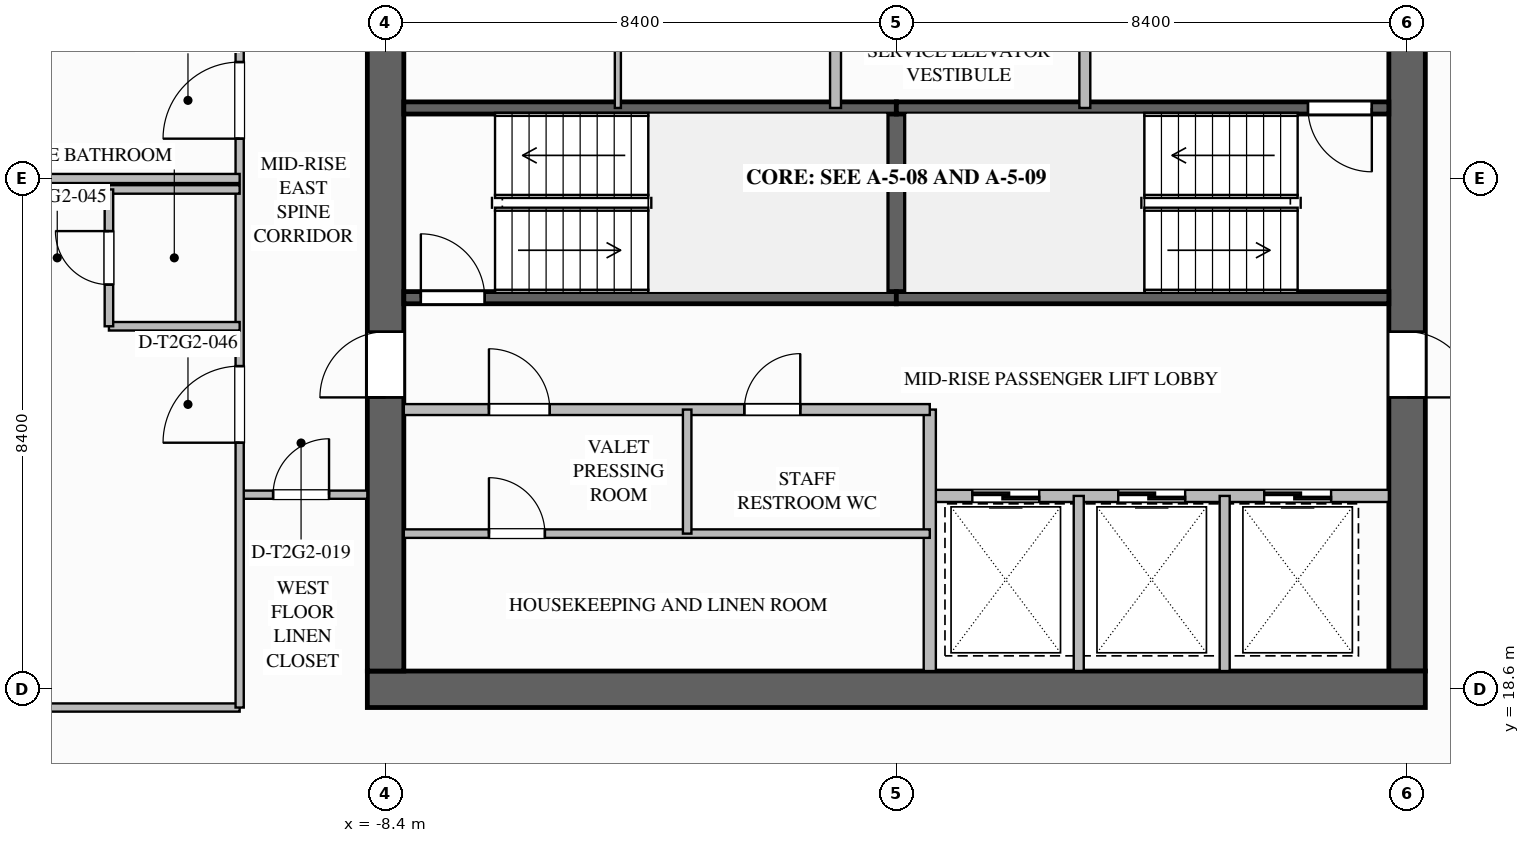
"""IFC4 building model, lengths in metres.
Left out: names, types, materials, properties, quantities, classifications, styles, units other than length and angle.
Written with IfcOpenShell. Run it as: python <this file> out.ifc"""

import sys

from ifc_helpers import new_model, si_unit, direction, frame, frame_2d, origin, place, context, subcontext, project, spatial, rectangle, extrude, element, fill, save


model = new_model("IFC4")
c1 = context("Model", 3, precision=1e-05, world=origin(), true_north=direction((0.0, 1.0)))
c2 = subcontext(c1, "Body", "Model", "MODEL_VIEW")
j1 = project(units=[si_unit("LENGTHUNIT", "METRE"), si_unit("PLANEANGLEUNIT", "RADIAN")], contexts=[c1])
p1 = place(None, origin())
s1 = spatial("IfcSite", under=j1, at=p1, CompositionType="ELEMENT")
p2 = place(p1, origin())
s2 = spatial("IfcBuilding", under=s1, at=p2, CompositionType="ELEMENT")
p3 = place(p2, frame((0.0, 0.0, 102.3)))
s3 = spatial("IfcBuildingStorey", under=s2, at=p3, CompositionType="ELEMENT", Elevation=102.3)
p4 = place(p3, frame((8.4, 35.1, 0.0), z_axis=(0.0, 0.0, 1.0), x_axis=(0.0, -1.0, 0.0)))
e1 = element("IfcWall", 1, at=p4, inside=s3, PredefinedType="SHEAR", context=c2, shape_type="SweptSolid", body=[
    extrude(rectangle(XDim=16.2, YDim=0.6, at=frame_2d((8.1, 0.0))), origin(), (0.0, 0.0, 1.0), 3.5),
])
p5 = place(p4, frame((3.08, 0.0, 0.0)))
e2 = element("IfcOpeningElement", 2, at=p5, cuts=e1, PredefinedType="OPENING", context=c2, shape_type="SweptSolid", body=[
    extrude(rectangle(XDim=1.12, YDim=2.1, at=frame_2d((0.56, 1.05))), frame((0.0, 0.31, 0.0), z_axis=(0.0, -1.0, 0.0), x_axis=(1.0, 0.0, 0.0)), (0.0, 0.0, 1.0), 0.62),
])
p6 = place(p4, frame((10.62, 0.0, 0.0)))
e3 = element("IfcOpeningElement", 3, at=p6, cuts=e1, PredefinedType="OPENING", context=c2, shape_type="SweptSolid", body=[
    extrude(rectangle(XDim=1.08, YDim=2.04, at=frame_2d((0.54, 1.02))), frame((0.0, 0.31, 0.0), z_axis=(0.0, -1.0, 0.0), x_axis=(1.0, 0.0, 0.0)), (0.0, 0.0, 1.0), 0.62),
])
p7 = place(p3, frame((8.7, 18.6, 0.0), z_axis=(0.0, 0.0, 1.0), x_axis=(-1.0, 0.0, 0.0)))
e4 = element("IfcWall", 4, at=p7, inside=s3, PredefinedType="SHEAR", context=c2, shape_type="SweptSolid", body=[
    extrude(rectangle(XDim=17.4, YDim=0.6, at=frame_2d((8.7, 0.0))), origin(), (0.0, 0.0, 1.0), 3.5),
])
p8 = place(p3, frame((-8.4, 18.9, 0.0), z_axis=(0.0, 0.0, 1.0), x_axis=(0.0, 1.0, 0.0)))
e5 = element("IfcWall", 5, at=p8, inside=s3, PredefinedType="SHEAR", context=c2, shape_type="SweptSolid", body=[
    extrude(rectangle(XDim=16.2, YDim=0.6, at=frame_2d((8.1, 0.0))), origin(), (0.0, 0.0, 1.0), 3.5),
])
p9 = place(p8, frame((4.5, 0.0, 0.0)))
e6 = element("IfcOpeningElement", 6, at=p9, cuts=e5, PredefinedType="OPENING", context=c2, shape_type="SweptSolid", body=[
    extrude(rectangle(XDim=1.08, YDim=2.04, at=frame_2d((0.54, 1.02))), frame((0.0, 0.31, 0.0), z_axis=(0.0, -1.0, 0.0), x_axis=(1.0, 0.0, 0.0)), (0.0, 0.0, 1.0), 0.62),
])
p10 = place(p3, frame((0.0, 25.04, 0.0), z_axis=(0.0, 0.0, 1.0), x_axis=(0.0, 1.0, 0.0)))
e7 = element("IfcWall", 7, at=p10, inside=s3, PredefinedType="SOLIDWALL", context=c2, shape_type="SweptSolid", body=[
    extrude(rectangle(XDim=3.12, YDim=0.3, at=frame_2d((1.56, 0.0))), origin(), (0.0, 0.0, 1.0), 3.24),
])
p11 = place(p3, frame((-8.1, 25.04, 0.0), z_axis=(0.0, 0.0, 1.0), x_axis=(1.0, 0.0, 0.0)))
e8 = element("IfcWall", 8, at=p11, inside=s3, PredefinedType="SOLIDWALL", context=c2, shape_type="SweptSolid", body=[
    extrude(rectangle(XDim=8.1, YDim=0.2, at=frame_2d((4.05, 0.0))), origin(), (0.0, 0.0, 1.0), 3.24),
])
p12 = place(p11, frame((0.28, 0.0, 0.0)))
e9 = element("IfcOpeningElement", 9, at=p12, cuts=e8, PredefinedType="OPENING", context=c2, shape_type="SweptSolid", body=[
    extrude(rectangle(XDim=1.05, YDim=2.1, at=frame_2d((0.525, 1.05))), frame((0.0, 0.11, 0.0), z_axis=(0.0, -1.0, 0.0), x_axis=(1.0, 0.0, 0.0)), (0.0, 0.0, 1.0), 0.22),
])
for number, where, z_axis, x_axis in (
    (10, (-8.1, 28.16, 0.0), (0.0, 0.0, 1.0), (1.0, 0.0, 0.0)),
    (11, (0.0, 25.04, 0.0), (0.0, 0.0, 1.0), (1.0, 0.0, 0.0)),
):
    element("IfcWall", number, at=place(p3, frame(where, z_axis=z_axis, x_axis=x_axis)), inside=s3, PredefinedType="SOLIDWALL", context=c2, shape_type="SweptSolid", body=[
        extrude(rectangle(XDim=8.1, YDim=0.2, at=frame_2d((4.05, 0.0))), origin(), (0.0, 0.0, 1.0), 3.24),
    ])
p13 = place(p3, frame((8.1, 28.16, 0.0), z_axis=(0.0, 0.0, 1.0), x_axis=(-1.0, 0.0, 0.0)))
e12 = element("IfcWall", 12, at=p13, inside=s3, PredefinedType="SOLIDWALL", context=c2, shape_type="SweptSolid", body=[
    extrude(rectangle(XDim=8.1, YDim=0.2, at=frame_2d((4.05, 0.0))), origin(), (0.0, 0.0, 1.0), 3.24),
])
p14 = place(p13, frame((0.28, 0.0, 0.0)))
e13 = element("IfcOpeningElement", 13, at=p14, cuts=e12, PredefinedType="OPENING", context=c2, shape_type="SweptSolid", body=[
    extrude(rectangle(XDim=1.05, YDim=2.1, at=frame_2d((0.525, 1.05))), frame((0.0, 0.11, 0.0), z_axis=(0.0, -1.0, 0.0), x_axis=(1.0, 0.0, 0.0)), (0.0, 0.0, 1.0), 0.22),
])
p15 = place(p3, frame((3.1, 28.16, 0.0), z_axis=(0.0, 0.0, 1.0), x_axis=(0.0, 1.0, 0.0)))
e14 = element("IfcWall", 14, at=p15, inside=s3, PredefinedType="SOLIDWALL", context=c2, shape_type="SweptSolid", body=[
    extrude(rectangle(XDim=4.06, YDim=0.18, at=frame_2d((2.03, 0.0))), origin(), (0.0, 0.0, 1.0), 3.24),
])
p16 = place(p15, frame((1.4, 0.0, 0.0)))
e15 = element("IfcOpeningElement", 15, at=p16, cuts=e14, PredefinedType="OPENING", context=c2, shape_type="SweptSolid", body=[
    extrude(rectangle(XDim=1.12, YDim=2.1, at=frame_2d((0.56, 1.05))), frame((0.0, 0.1, 0.0), z_axis=(0.0, -1.0, 0.0), x_axis=(1.0, 0.0, 0.0)), (0.0, 0.0, 1.0), 0.2),
])
p17 = place(p3, frame((-1.0, 28.16, 0.0), z_axis=(0.0, 0.0, 1.0), x_axis=(0.0, 1.0, 0.0)))
e16 = element("IfcWall", 16, at=p17, inside=s3, PredefinedType="SOLIDWALL", context=c2, shape_type="SweptSolid", body=[
    extrude(rectangle(XDim=4.02, YDim=0.18, at=frame_2d((2.01, 0.0))), origin(), (0.0, 0.0, 1.0), 3.24),
])
p18 = place(p17, frame((1.4, 0.0, 0.0)))
e17 = element("IfcOpeningElement", 17, at=p18, cuts=e16, PredefinedType="OPENING", context=c2, shape_type="SweptSolid", body=[
    extrude(rectangle(XDim=1.0, YDim=2.1, at=frame_2d((0.5, 1.05))), frame((0.0, 0.1, 0.0), z_axis=(0.0, -1.0, 0.0), x_axis=(1.0, 0.0, 0.0)), (0.0, 0.0, 1.0), 0.2),
])
p19 = place(p3, frame((-4.58, 28.16, 0.0), z_axis=(0.0, 0.0, 1.0), x_axis=(0.0, 1.0, 0.0)))
e18 = element("IfcWall", 18, at=p19, inside=s3, PredefinedType="PARTITIONING", context=c2, shape_type="SweptSolid", body=[
    extrude(rectangle(XDim=4.06, YDim=0.1, at=frame_2d((2.03, 0.0))), origin(), (0.0, 0.0, 1.0), 3.24),
])
p20 = place(p19, frame((1.2, 0.0, 0.0)))
e19 = element("IfcOpeningElement", 19, at=p20, cuts=e18, PredefinedType="OPENING", context=c2, shape_type="SweptSolid", body=[
    extrude(rectangle(XDim=0.92, YDim=2.1, at=frame_2d((0.46, 1.05))), frame((0.0, 0.06, 0.0), z_axis=(0.0, -1.0, 0.0), x_axis=(1.0, 0.0, 0.0)), (0.0, 0.0, 1.0), 0.12),
])
p21 = place(p3, frame((8.1, 21.78, 0.0), z_axis=(0.0, 0.0, 1.0), x_axis=(-1.0, 0.0, 0.0)))
e20 = element("IfcWall", 20, at=p21, inside=s3, PredefinedType="SOLIDWALL", context=c2, shape_type="SweptSolid", body=[
    extrude(rectangle(XDim=7.55, YDim=0.2, at=frame_2d((3.775, 0.0))), origin(), (0.0, 0.0, 1.0), 3.24),
])
p22 = place(p21, frame((5.75, 0.0, 0.0)))
e21 = element("IfcOpeningElement", 21, at=p22, cuts=e20, PredefinedType="OPENING", context=c2, shape_type="SweptSolid", body=[
    extrude(rectangle(XDim=1.1, YDim=2.2, at=frame_2d((0.55, 1.1))), frame((0.0, 0.11, 0.0), z_axis=(0.0, -1.0, 0.0), x_axis=(1.0, 0.0, 0.0)), (0.0, 0.0, 1.0), 0.22),
])
p23 = place(p21, frame((3.35, 0.0, 0.0)))
e22 = element("IfcOpeningElement", 22, at=p23, cuts=e20, PredefinedType="OPENING", context=c2, shape_type="SweptSolid", body=[
    extrude(rectangle(XDim=1.1, YDim=2.2, at=frame_2d((0.55, 1.1))), frame((0.0, 0.11, 0.0), z_axis=(0.0, -1.0, 0.0), x_axis=(1.0, 0.0, 0.0)), (0.0, 0.0, 1.0), 0.22),
])
p24 = place(p21, frame((0.95, 0.0, 0.0)))
e23 = element("IfcOpeningElement", 23, at=p24, cuts=e20, PredefinedType="OPENING", context=c2, shape_type="SweptSolid", body=[
    extrude(rectangle(XDim=1.1, YDim=2.2, at=frame_2d((0.55, 1.1))), frame((0.0, 0.11, 0.0), z_axis=(0.0, -1.0, 0.0), x_axis=(1.0, 0.0, 0.0)), (0.0, 0.0, 1.0), 0.22),
])
p25 = place(p3, frame((0.55, 18.9, 0.0), z_axis=(0.0, 0.0, 1.0), x_axis=(0.0, 1.0, 0.0)))
e24 = element("IfcWall", 24, at=p25, inside=s3, PredefinedType="SOLIDWALL", context=c2, shape_type="SweptSolid", body=[
    extrude(rectangle(XDim=4.3, YDim=0.2, at=frame_2d((2.15, 0.0))), origin(), (0.0, 0.0, 1.0), 3.24),
])
for number, where, z_axis, x_axis in (
    (25, (3.0, 18.9, 0.0), (0.0, 0.0, 1.0), (0.0, 1.0, 0.0)),
    (26, (5.4, 18.9, 0.0), (0.0, 0.0, 1.0), (0.0, 1.0, 0.0)),
):
    element("IfcWall", number, at=place(p3, frame(where, z_axis=z_axis, x_axis=x_axis)), inside=s3, PredefinedType="PARTITIONING", context=c2, shape_type="SweptSolid", body=[
        extrude(rectangle(XDim=2.88, YDim=0.165, at=frame_2d((1.44, 0.0))), origin(), (0.0, 0.0, 1.0), 3.24),
    ])
p26 = place(p3, frame((-8.1, 23.2, 0.0), z_axis=(0.0, 0.0, 1.0), x_axis=(1.0, 0.0, 0.0)))
e27 = element("IfcWall", 27, at=p26, inside=s3, PredefinedType="SOLIDWALL", context=c2, shape_type="SweptSolid", body=[
    extrude(rectangle(XDim=8.65, YDim=0.18, at=frame_2d((4.325, 0.0))), origin(), (0.0, 0.0, 1.0), 3.24),
])
p27 = place(p26, frame((1.4, 0.0, 0.0)))
e28 = element("IfcOpeningElement", 28, at=p27, cuts=e27, PredefinedType="OPENING", context=c2, shape_type="SweptSolid", body=[
    extrude(rectangle(XDim=1.0, YDim=2.1, at=frame_2d((0.5, 1.05))), frame((0.0, 0.1, 0.0), z_axis=(0.0, -1.0, 0.0), x_axis=(1.0, 0.0, 0.0)), (0.0, 0.0, 1.0), 0.2),
])
p28 = place(p26, frame((5.6, 0.0, 0.0)))
e29 = element("IfcOpeningElement", 29, at=p28, cuts=e27, PredefinedType="OPENING", context=c2, shape_type="SweptSolid", body=[
    extrude(rectangle(XDim=0.92, YDim=2.1, at=frame_2d((0.46, 1.05))), frame((0.0, 0.1, 0.0), z_axis=(0.0, -1.0, 0.0), x_axis=(1.0, 0.0, 0.0)), (0.0, 0.0, 1.0), 0.2),
])
p29 = place(p3, frame((-8.1, 21.16, 0.0), z_axis=(0.0, 0.0, 1.0), x_axis=(1.0, 0.0, 0.0)))
e30 = element("IfcWall", 30, at=p29, inside=s3, PredefinedType="PLUMBINGWALL", context=c2, shape_type="SweptSolid", body=[
    extrude(rectangle(XDim=8.65, YDim=0.14, at=frame_2d((4.325, 0.0))), origin(), (0.0, 0.0, 1.0), 3.24),
])
p30 = place(p29, frame((1.4, 0.0, 0.0)))
e31 = element("IfcOpeningElement", 31, at=p30, cuts=e30, PredefinedType="OPENING", context=c2, shape_type="SweptSolid", body=[
    extrude(rectangle(XDim=0.92, YDim=2.1, at=frame_2d((0.46, 1.05))), frame((0.0, 0.08, 0.0), z_axis=(0.0, -1.0, 0.0), x_axis=(1.0, 0.0, 0.0)), (0.0, 0.0, 1.0), 0.16),
])
p31 = place(p3, frame((-3.44, 21.16, 0.0), z_axis=(0.0, 0.0, 1.0), x_axis=(0.0, 1.0, 0.0)))
e32 = element("IfcWall", 32, at=p31, inside=s3, PredefinedType="PLUMBINGWALL", context=c2, shape_type="SweptSolid", body=[
    extrude(rectangle(XDim=2.04, YDim=0.14, at=frame_2d((1.02, 0.0))), origin(), (0.0, 0.0, 1.0), 3.24),
])
p32 = place(p3, frame((-10.8, 21.8, 0.0), z_axis=(0.0, 0.0, 1.0), x_axis=(1.0, 0.0, 0.0)))
e33 = element("IfcWall", 33, at=p32, inside=s3, PredefinedType="PARTITIONING", context=c2, shape_type="SweptSolid", body=[
    extrude(rectangle(XDim=2.1, YDim=0.135, at=frame_2d((1.05, 0.0))), origin(), (0.0, 0.0, 1.0), 3.24),
])
p33 = place(p32, frame((0.55, 0.0, 0.0)))
e34 = element("IfcOpeningElement", 34, at=p33, cuts=e33, PredefinedType="OPENING", context=c2, shape_type="SweptSolid", body=[
    extrude(rectangle(XDim=0.92, YDim=2.1, at=frame_2d((0.46, 1.05))), frame((0.0, 0.077, 0.0), z_axis=(0.0, -1.0, 0.0), x_axis=(1.0, 0.0, 0.0)), (0.0, 0.0, 1.0), 0.155),
])
p34 = place(p3, frame((-16.2, 18.3, 0.0), z_axis=(0.0, 0.0, 1.0), x_axis=(1.0, 0.0, 0.0)))
e35 = element("IfcWall", 35, at=p34, inside=s3, PredefinedType="PARTITIONING", context=c2, shape_type="SweptSolid", body=[
    extrude(rectangle(XDim=5.4, YDim=0.135, at=frame_2d((2.7, 0.0))), origin(), (0.0, 0.0, 1.0), 3.24),
])
p35 = place(p3, frame((-10.8, 18.3, 0.0), z_axis=(0.0, 0.0, 1.0), x_axis=(0.0, 1.0, 0.0)))
e36 = element("IfcWall", 36, at=p35, inside=s3, PredefinedType="PARTITIONING", context=c2, shape_type="SweptSolid", body=[
    extrude(rectangle(XDim=17.4, YDim=0.135, at=frame_2d((8.7, 0.0))), origin(), (0.0, 0.0, 1.0), 3.24),
])
p36 = place(p35, frame((4.355, 0.0, 0.0)))
e37 = element("IfcOpeningElement", 37, at=p36, cuts=e36, PredefinedType="OPENING", context=c2, shape_type="SweptSolid", body=[
    extrude(rectangle(XDim=1.26, YDim=2.2, at=frame_2d((0.63, 1.1))), frame((0.0, 0.077, 0.0), z_axis=(0.0, -1.0, 0.0), x_axis=(1.0, 0.0, 0.0)), (0.0, 0.0, 1.0), 0.155),
])
p37 = place(p35, frame((9.355, 0.0, 0.0)))
e38 = element("IfcOpeningElement", 38, at=p37, cuts=e36, PredefinedType="OPENING", context=c2, shape_type="SweptSolid", body=[
    extrude(rectangle(XDim=1.26, YDim=2.2, at=frame_2d((0.63, 1.1))), frame((0.0, 0.077, 0.0), z_axis=(0.0, -1.0, 0.0), x_axis=(1.0, 0.0, 0.0)), (0.0, 0.0, 1.0), 0.155),
])
p38 = place(p3, frame((-26.2, 27.0, 0.0), z_axis=(0.0, 0.0, 1.0), x_axis=(1.0, 0.0, 0.0)))
e39 = element("IfcWall", 39, at=p38, inside=s3, PredefinedType="PARTITIONING", context=c2, shape_type="SweptSolid", body=[
    extrude(rectangle(XDim=15.4, YDim=0.15, at=frame_2d((7.7, 0.0))), origin(), (0.0, 0.0, 1.0), 2.452),
])
p39 = place(p3, frame((-10.8, 24.57, 0.0), z_axis=(0.0, 0.0, 1.0), x_axis=(-1.0, 0.0, 0.0)))
e40 = element("IfcWall", 40, at=p39, inside=s3, PredefinedType="PLUMBINGWALL", context=c2, shape_type="SweptSolid", body=[
    extrude(rectangle(XDim=2.15, YDim=0.14, at=frame_2d((1.075, 0.0))), origin(), (0.0, 0.0, 1.0), 3.24),
])
p40 = place(p3, frame((-10.8, 26.82, 0.0), z_axis=(0.0, 0.0, 1.0), x_axis=(-1.0, 0.0, 0.0)))
e41 = element("IfcWall", 41, at=p40, inside=s3, PredefinedType="PLUMBINGWALL", context=c2, shape_type="SweptSolid", body=[
    extrude(rectangle(XDim=2.15, YDim=0.14, at=frame_2d((1.075, 0.0))), origin(), (0.0, 0.0, 1.0), 2.617),
])
p41 = place(p3, frame((-12.95, 24.57, 0.0), z_axis=(0.0, 0.0, 1.0), x_axis=(0.0, 1.0, 0.0)))
e42 = element("IfcWall", 42, at=p41, inside=s3, PredefinedType="PLUMBINGWALL", context=c2, shape_type="SweptSolid", body=[
    extrude(rectangle(XDim=2.25, YDim=0.14, at=frame_2d((1.125, 0.0))), origin(), (0.0, 0.0, 1.0), 3.24),
])
p42 = place(p41, frame((0.685, 0.0, 0.0)))
e43 = element("IfcOpeningElement", 43, at=p42, cuts=e42, PredefinedType="OPENING", context=c2, shape_type="SweptSolid", body=[
    extrude(rectangle(XDim=0.88, YDim=2.1, at=frame_2d((0.44, 1.05))), frame((0.0, 0.08, 0.0), z_axis=(0.0, -1.0, 0.0), x_axis=(1.0, 0.0, 0.0)), (0.0, 0.0, 1.0), 0.16),
])
p43 = place(p12, origin())
e44 = element("IfcDoor", 44, at=p43, inside=s3, OperationType="SINGLE_SWING_LEFT", PredefinedType="DOOR", context=c2, shape_type="SweptSolid", body=[
    extrude(rectangle(XDim=1.05, YDim=2.1, at=frame_2d((0.525, 1.05))), frame((0.0, 0.025, 0.0), z_axis=(0.0, -1.0, 0.0), x_axis=(1.0, 0.0, 0.0)), (0.0, 0.0, 1.0), 0.05),
])
fill(e9, e44)
p44 = place(p14, origin())
e45 = element("IfcDoor", 45, at=p44, inside=s3, OperationType="SINGLE_SWING_LEFT", PredefinedType="DOOR", context=c2, shape_type="SweptSolid", body=[
    extrude(rectangle(XDim=1.05, YDim=2.1, at=frame_2d((0.525, 1.05))), frame((0.0, 0.025, 0.0), z_axis=(0.0, -1.0, 0.0), x_axis=(1.0, 0.0, 0.0)), (0.0, 0.0, 1.0), 0.05),
])
fill(e13, e45)
p45 = place(p22, origin())
e46 = element("IfcDoor", 46, at=p45, inside=s3, OperationType="SLIDING_TO_LEFT", PredefinedType="DOOR", context=c2, shape_type="SweptSolid", body=[
    extrude(rectangle(XDim=1.1, YDim=2.2, at=frame_2d((0.55, 1.1))), frame((0.0, 0.025, 0.0), z_axis=(0.0, -1.0, 0.0), x_axis=(1.0, 0.0, 0.0)), (0.0, 0.0, 1.0), 0.05),
])
fill(e21, e46)
p46 = place(p23, origin())
e47 = element("IfcDoor", 47, at=p46, inside=s3, OperationType="SLIDING_TO_LEFT", PredefinedType="DOOR", context=c2, shape_type="SweptSolid", body=[
    extrude(rectangle(XDim=1.1, YDim=2.2, at=frame_2d((0.55, 1.1))), frame((0.0, 0.025, 0.0), z_axis=(0.0, -1.0, 0.0), x_axis=(1.0, 0.0, 0.0)), (0.0, 0.0, 1.0), 0.05),
])
fill(e22, e47)
p47 = place(p24, origin())
e48 = element("IfcDoor", 48, at=p47, inside=s3, OperationType="SLIDING_TO_LEFT", PredefinedType="DOOR", context=c2, shape_type="SweptSolid", body=[
    extrude(rectangle(XDim=1.1, YDim=2.2, at=frame_2d((0.55, 1.1))), frame((0.0, 0.025, 0.0), z_axis=(0.0, -1.0, 0.0), x_axis=(1.0, 0.0, 0.0)), (0.0, 0.0, 1.0), 0.05),
])
fill(e23, e48)
p48 = place(p9, origin())
e49 = element("IfcDoor", 49, at=p48, inside=s3, OperationType="SINGLE_SWING_LEFT", PredefinedType="DOOR", context=c2, shape_type="SweptSolid", body=[
    extrude(rectangle(XDim=1.08, YDim=2.04, at=frame_2d((0.54, 1.02))), frame((0.0, 0.025, 0.0), z_axis=(0.0, -1.0, 0.0), x_axis=(1.0, 0.0, 0.0)), (0.0, 0.0, 1.0), 0.05),
])
fill(e6, e49)
p49 = place(p6, origin())
e50 = element("IfcDoor", 50, at=p49, inside=s3, OperationType="SINGLE_SWING_RIGHT", PredefinedType="DOOR", context=c2, shape_type="SweptSolid", body=[
    extrude(rectangle(XDim=1.08, YDim=2.04, at=frame_2d((0.54, 1.02))), frame((0.0, 0.025, 0.0), z_axis=(0.0, -1.0, 0.0), x_axis=(1.0, 0.0, 0.0)), (0.0, 0.0, 1.0), 0.05),
])
fill(e3, e50)
p50 = place(p27, origin())
e51 = element("IfcDoor", 51, at=p50, inside=s3, OperationType="SINGLE_SWING_LEFT", PredefinedType="DOOR", context=c2, shape_type="SweptSolid", body=[
    extrude(rectangle(XDim=1.0, YDim=2.1, at=frame_2d((0.5, 1.05))), frame((0.0, 0.025, 0.0), z_axis=(0.0, -1.0, 0.0), x_axis=(1.0, 0.0, 0.0)), (0.0, 0.0, 1.0), 0.05),
])
fill(e28, e51)
p51 = place(p28, origin())
e52 = element("IfcDoor", 52, at=p51, inside=s3, OperationType="SINGLE_SWING_RIGHT", PredefinedType="DOOR", context=c2, shape_type="SweptSolid", body=[
    extrude(rectangle(XDim=0.92, YDim=2.1, at=frame_2d((0.46, 1.05))), frame((0.0, 0.025, 0.0), z_axis=(0.0, -1.0, 0.0), x_axis=(1.0, 0.0, 0.0)), (0.0, 0.0, 1.0), 0.05),
])
fill(e29, e52)
p52 = place(p30, origin())
e53 = element("IfcDoor", 53, at=p52, inside=s3, OperationType="SINGLE_SWING_LEFT", PredefinedType="DOOR", context=c2, shape_type="SweptSolid", body=[
    extrude(rectangle(XDim=0.92, YDim=2.1, at=frame_2d((0.46, 1.05))), frame((0.0, 0.025, 0.0), z_axis=(0.0, -1.0, 0.0), x_axis=(1.0, 0.0, 0.0)), (0.0, 0.0, 1.0), 0.05),
])
fill(e31, e53)
p53 = place(p33, origin())
e54 = element("IfcDoor", 54, at=p53, inside=s3, OperationType="SINGLE_SWING_RIGHT", PredefinedType="DOOR", context=c2, shape_type="SweptSolid", body=[
    extrude(rectangle(XDim=0.92, YDim=2.1, at=frame_2d((0.46, 1.05))), frame((0.0, 0.025, 0.0), z_axis=(0.0, -1.0, 0.0), x_axis=(1.0, 0.0, 0.0)), (0.0, 0.0, 1.0), 0.05),
])
fill(e34, e54)
p54 = place(p42, origin())
e55 = element("IfcDoor", 55, at=p54, inside=s3, OperationType="SINGLE_SWING_RIGHT", PredefinedType="DOOR", context=c2, shape_type="SweptSolid", body=[
    extrude(rectangle(XDim=0.88, YDim=2.1, at=frame_2d((0.44, 1.05))), frame((0.0, 0.025, 0.0), z_axis=(0.0, -1.0, 0.0), x_axis=(1.0, 0.0, 0.0)), (0.0, 0.0, 1.0), 0.05),
])
fill(e43, e55)
p55 = place(p36, origin())
e56 = element("IfcDoor", 56, at=p55, inside=s3, OperationType="SINGLE_SWING_LEFT", PredefinedType="DOOR", context=c2, shape_type="SweptSolid", body=[
    extrude(rectangle(XDim=1.26, YDim=2.2, at=frame_2d((0.63, 1.1))), frame((0.0, 0.025, 0.0), z_axis=(0.0, -1.0, 0.0), x_axis=(1.0, 0.0, 0.0)), (0.0, 0.0, 1.0), 0.05),
])
fill(e37, e56)
p56 = place(p37, origin())
e57 = element("IfcDoor", 57, at=p56, inside=s3, OperationType="SINGLE_SWING_LEFT", PredefinedType="DOOR", context=c2, shape_type="SweptSolid", body=[
    extrude(rectangle(XDim=1.26, YDim=2.2, at=frame_2d((0.63, 1.1))), frame((0.0, 0.025, 0.0), z_axis=(0.0, -1.0, 0.0), x_axis=(1.0, 0.0, 0.0)), (0.0, 0.0, 1.0), 0.05),
])
fill(e38, e57)
save(model, sys.argv[1])
